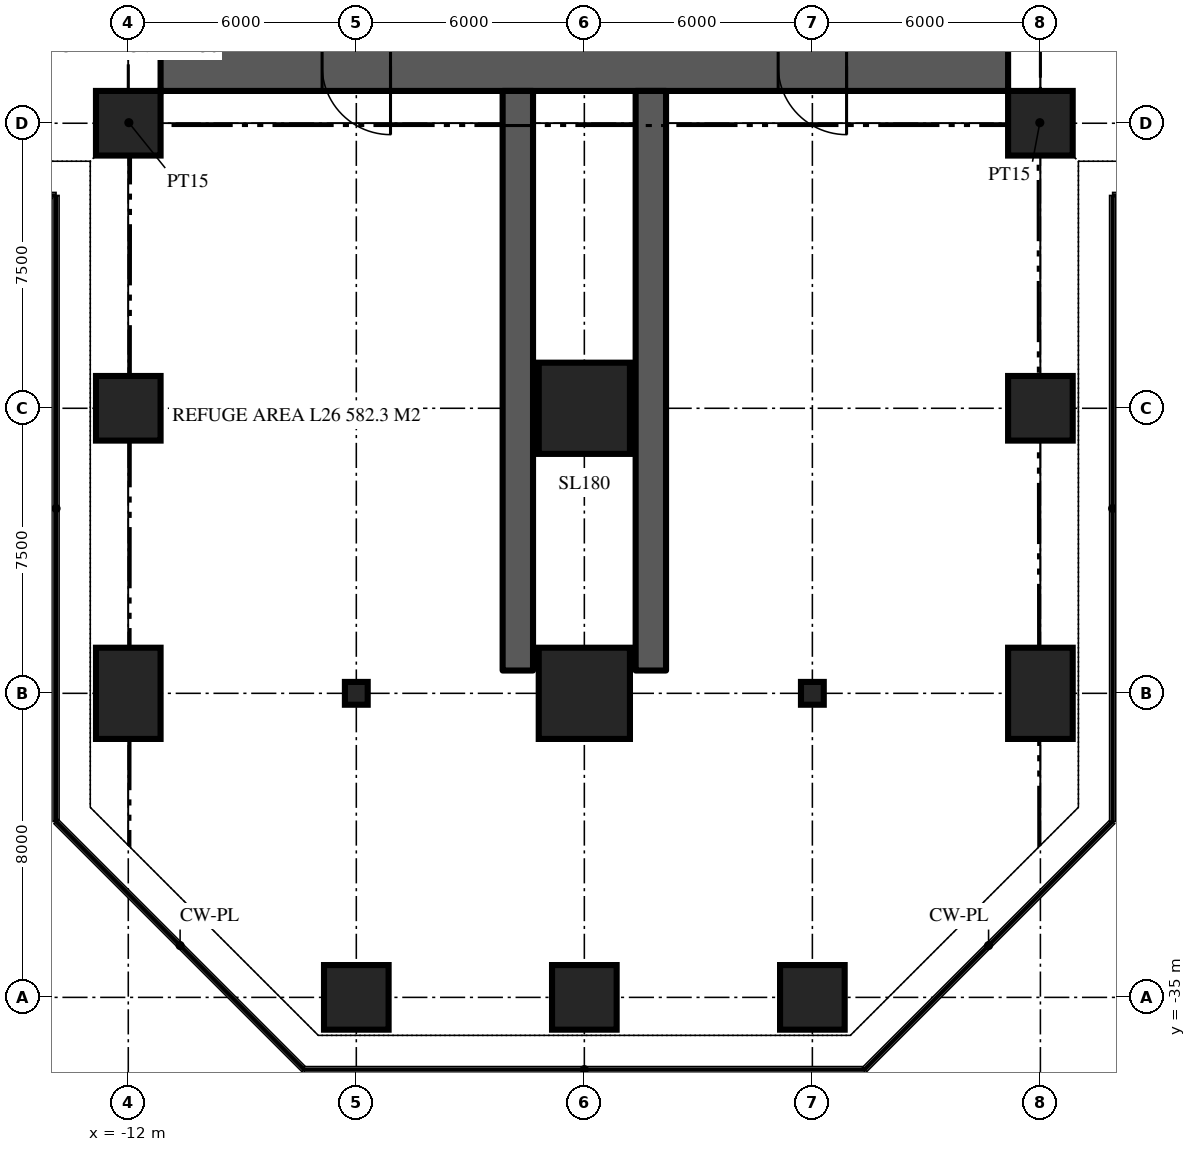
"""IFC4 building model, lengths in metres.
Left out: names, types, materials, properties, quantities, classifications, styles, units other than length and angle.
Written with IfcOpenShell. Run it as: python <this file> out.ifc"""

import sys

from ifc_helpers import new_model, si_unit, direction, frame, frame_2d, origin, origin_2d, place, context, subcontext, project, spatial, rectangle, hollow_rectangle, extrude, element, fill, save


model = new_model("IFC4")
c1 = context("Model", 3, precision=1e-05, world=origin(), true_north=direction((0.0, 1.0)))
c2 = subcontext(c1, "Body", "Model", "MODEL_VIEW")
j1 = project(units=[si_unit("LENGTHUNIT", "METRE"), si_unit("PLANEANGLEUNIT", "RADIAN")], contexts=[c1])
p1 = place(None, origin())
s1 = spatial("IfcSite", under=j1, at=p1, CompositionType="ELEMENT")
p2 = place(p1, origin())
s2 = spatial("IfcBuilding", under=s1, at=p2, CompositionType="ELEMENT")
p3 = place(p2, frame((0.0, 0.0, 118.2)))
s3 = spatial("IfcBuildingStorey", under=s2, at=p3, CompositionType="ELEMENT", Elevation=118.2)
p4 = place(p3, frame((11.15, -10.5, 0.0), z_axis=(0.0, 0.0, 1.0), x_axis=(-1.0, 0.0, 0.0)))
e1 = element("IfcWall", 1, at=p4, inside=s3, PredefinedType="SHEAR", context=c2, shape_type="SweptSolid", body=[
    extrude(rectangle(XDim=22.3, YDim=1.3, at=frame_2d((11.15, 0.0))), origin(), (0.0, 0.0, 1.0), 6.0),
])
p5 = place(p4, frame((16.25, 0.0, 0.0)))
e2 = element("IfcOpeningElement", 2, at=p5, cuts=e1, PredefinedType="OPENING", context=c2, shape_type="SweptSolid", body=[
    extrude(rectangle(XDim=1.8, YDim=2.2, at=frame_2d((0.9, 1.1))), frame((0.0, 0.66, 0.0), z_axis=(0.0, -1.0, 0.0), x_axis=(1.0, 0.0, 0.0)), (0.0, 0.0, 1.0), 1.32),
])
p6 = place(p4, frame((4.25, 0.0, 0.0)))
e3 = element("IfcOpeningElement", 3, at=p6, cuts=e1, PredefinedType="OPENING", context=c2, shape_type="SweptSolid", body=[
    extrude(rectangle(XDim=1.8, YDim=2.2, at=frame_2d((0.9, 1.1))), frame((0.0, 0.66, 0.0), z_axis=(0.0, -1.0, 0.0), x_axis=(1.0, 0.0, 0.0)), (0.0, 0.0, 1.0), 1.32),
])
for number, where, z_axis, x_axis in (
    (4, (-1.75, -11.15, 0.0), (0.0, 0.0, 1.0), (0.0, -1.0, 0.0)),
    (5, (1.75, -11.15, 0.0), (0.0, 0.0, 1.0), (0.0, -1.0, 0.0)),
):
    element("IfcWall", number, at=place(p3, frame(where, z_axis=z_axis, x_axis=x_axis)), inside=s3, PredefinedType="SHEAR", context=c2, shape_type="SweptSolid", body=[
        extrude(rectangle(XDim=15.25, YDim=0.8, at=frame_2d((7.625, 0.0))), origin(), (0.0, 0.0, 1.0), 6.0),
    ])
for number, where, z_axis, x_axis in (
    (6, (-6.0, -35.0, 0.0), (0.0, 0.0, 1.0), (1.0, 0.0, 0.0)),
    (7, (0.0, -35.0, 0.0), (0.0, 0.0, 1.0), (1.0, 0.0, 0.0)),
    (8, (6.0, -35.0, 0.0), (0.0, 0.0, 1.0), (1.0, 0.0, 0.0)),
):
    element("IfcColumn", number, at=place(p3, frame(where, z_axis=z_axis, x_axis=x_axis)), inside=s3, PredefinedType="COLUMN", context=c2, shape_type="SweptSolid", body=[
        extrude(rectangle(XDim=1.7, YDim=1.7, at=origin_2d()), origin(), (0.0, 0.0, 1.0), 6.0),
    ])
p7 = place(p3, frame((-12.0, -27.0, 0.0), z_axis=(0.0, 0.0, 1.0), x_axis=(1.0, 0.0, 0.0)))
e9 = element("IfcColumn", 9, at=p7, inside=s3, PredefinedType="COLUMN", context=c2, shape_type="SweptSolid", body=[
    extrude(rectangle(XDim=1.7, YDim=2.4, at=origin_2d()), origin(), (0.0, 0.0, 1.0), 6.0),
])
p8 = place(p3, frame((0.0, -27.0, 0.0), z_axis=(0.0, 0.0, 1.0), x_axis=(1.0, 0.0, 0.0)))
e10 = element("IfcColumn", 10, at=p8, inside=s3, PredefinedType="COLUMN", context=c2, shape_type="SweptSolid", body=[
    extrude(rectangle(XDim=2.4, YDim=2.4, at=origin_2d()), origin(), (0.0, 0.0, 1.0), 6.0),
])
p9 = place(p3, frame((12.0, -27.0, 0.0), z_axis=(0.0, 0.0, 1.0), x_axis=(1.0, 0.0, 0.0)))
e11 = element("IfcColumn", 11, at=p9, inside=s3, PredefinedType="COLUMN", context=c2, shape_type="SweptSolid", body=[
    extrude(rectangle(XDim=1.7, YDim=2.4, at=origin_2d()), origin(), (0.0, 0.0, 1.0), 6.0),
])
p10 = place(p3, frame((-12.0, -19.5, 0.0), z_axis=(0.0, 0.0, 1.0), x_axis=(1.0, 0.0, 0.0)))
e12 = element("IfcColumn", 12, at=p10, inside=s3, PredefinedType="COLUMN", context=c2, shape_type="SweptSolid", body=[
    extrude(rectangle(XDim=1.7, YDim=1.7, at=origin_2d()), origin(), (0.0, 0.0, 1.0), 6.0),
])
p11 = place(p3, frame((0.0, -19.5, 0.0), z_axis=(0.0, 0.0, 1.0), x_axis=(1.0, 0.0, 0.0)))
e13 = element("IfcColumn", 13, at=p11, inside=s3, PredefinedType="COLUMN", context=c2, shape_type="SweptSolid", body=[
    extrude(rectangle(XDim=2.4, YDim=2.4, at=origin_2d()), origin(), (0.0, 0.0, 1.0), 6.0),
])
for number, where, z_axis, x_axis in (
    (14, (12.0, -19.5, 0.0), (0.0, 0.0, 1.0), (1.0, 0.0, 0.0)),
    (15, (-12.0, -12.0, 0.0), (0.0, 0.0, 1.0), (1.0, 0.0, 0.0)),
    (16, (12.0, -12.0, 0.0), (0.0, 0.0, 1.0), (1.0, 0.0, 0.0)),
):
    element("IfcColumn", number, at=place(p3, frame(where, z_axis=z_axis, x_axis=x_axis)), inside=s3, PredefinedType="COLUMN", context=c2, shape_type="SweptSolid", body=[
        extrude(rectangle(XDim=1.7, YDim=1.7, at=origin_2d()), origin(), (0.0, 0.0, 1.0), 6.0),
    ])
for number, where, z_axis, x_axis in (
    (17, (-6.0, -27.0, -0.18), (0.0, 0.0, 1.0), (1.0, 0.0, 0.0)),
    (18, (6.0, -27.0, -0.18), (0.0, 0.0, 1.0), (1.0, 0.0, 0.0)),
):
    element("IfcColumn", number, at=place(p3, frame(where, z_axis=z_axis, x_axis=x_axis)), inside=s3, PredefinedType="COLUMN", context=c2, shape_type="SweptSolid", body=[
        extrude(hollow_rectangle(XDim=1.0, YDim=1.0, WallThickness=0.06, at=origin_2d()), origin(), (0.0, 0.0, 1.0), 5.05),
    ])
for number, where, z_axis, x_axis in (
    (19, (-11.15, -11.15, 0.0), (0.0, 0.0, 1.0), (-0.707, -0.707, 0.0)),
    (20, (11.15, -11.15, 0.0), (0.0, 0.0, 1.0), (0.707, -0.707, 0.0)),
):
    element("IfcWall", number, at=place(p3, frame(where, z_axis=z_axis, x_axis=x_axis)), inside=s3, PredefinedType="PARTITIONING", context=c2, shape_type="SweptSolid", body=[
        extrude(rectangle(XDim=2.362, YDim=0.15, at=frame_2d((1.181, 0.0))), origin(), (0.0, 0.0, 1.0), 5.32),
    ])
p12 = place(p5, origin())
e21 = element("IfcDoor", 21, at=p12, inside=s3, OperationType="DOUBLE_DOOR_DOUBLE_SWING", PredefinedType="DOOR", context=c2, shape_type="SweptSolid", body=[
    extrude(rectangle(XDim=1.8, YDim=2.2, at=frame_2d((0.9, 1.1))), frame((0.0, 0.025, 0.0), z_axis=(0.0, -1.0, 0.0), x_axis=(1.0, 0.0, 0.0)), (0.0, 0.0, 1.0), 0.05),
])
fill(e2, e21)
p13 = place(p6, origin())
e22 = element("IfcDoor", 22, at=p13, inside=s3, OperationType="DOUBLE_DOOR_DOUBLE_SWING", PredefinedType="DOOR", context=c2, shape_type="SweptSolid", body=[
    extrude(rectangle(XDim=1.8, YDim=2.2, at=frame_2d((0.9, 1.1))), frame((0.0, 0.025, 0.0), z_axis=(0.0, -1.0, 0.0), x_axis=(1.0, 0.0, 0.0)), (0.0, 0.0, 1.0), 0.05),
])
fill(e3, e22)
save(model, sys.argv[1])
